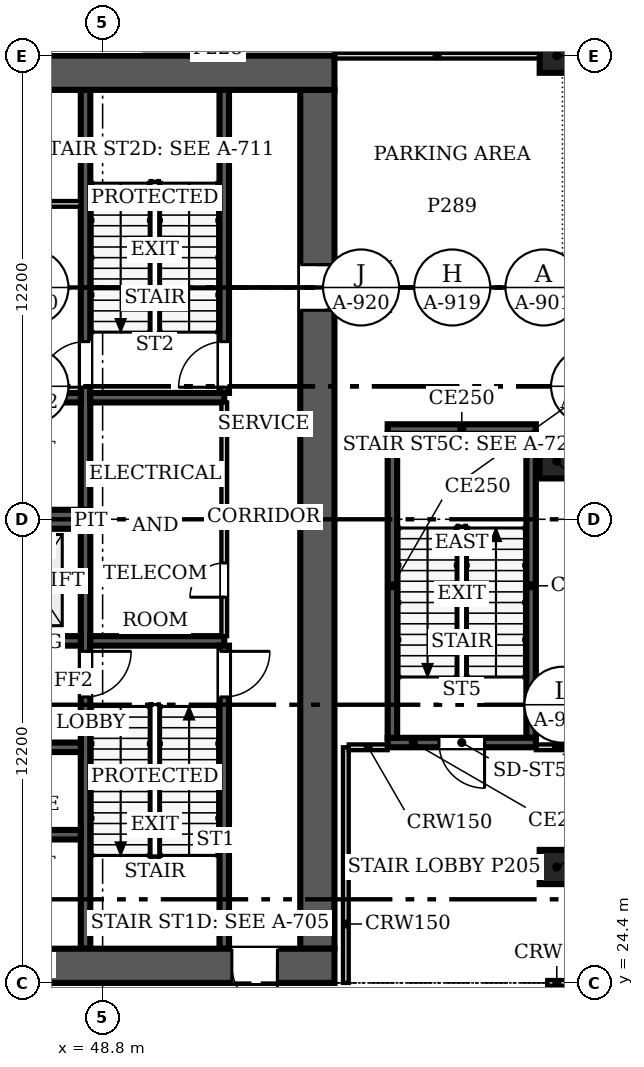
"""IFC4 building model, lengths in metres.
Left out: names, types, materials, properties, quantities, classifications, styles, units other than length and angle.
Written with IfcOpenShell. Run it as: python <this file> out.ifc"""

import sys

from ifc_helpers import new_model, si_unit, direction, frame, frame_2d, origin, origin_2d, place, context, subcontext, project, spatial, rectangle, extrude, source, transform, mapped, element, fill, save


model = new_model("IFC4")
c1 = context("Model", 3, precision=1e-05, world=origin(), true_north=direction((0.0, 1.0)))
c2 = subcontext(c1, "Body", "Model", "MODEL_VIEW")
j1 = project(units=[si_unit("LENGTHUNIT", "METRE"), si_unit("PLANEANGLEUNIT", "RADIAN")], contexts=[c1])
p1 = place(None, origin())
s1 = spatial("IfcSite", under=j1, at=p1, CompositionType="ELEMENT")
p2 = place(p1, origin())
s2 = spatial("IfcBuilding", under=s1, at=p2, CompositionType="ELEMENT")
p3 = place(p2, frame((0.0, 0.0, -5.4)))
s3 = spatial("IfcBuildingStorey", under=s2, at=p3, CompositionType="ELEMENT", Elevation=-5.4)
for number, where, z_axis, x_axis in (
    (1, (60.75, 27.45, 0.0), (0.0, 0.0, 1.0), (1.0, 0.0, 0.0)),
    (2, (60.75, 38.125, 0.0), (0.0, 0.0, 1.0), (1.0, 0.0, 0.0)),
    (3, (60.75, 48.8, 0.0), (0.0, 0.0, 1.0), (1.0, 0.0, 0.0)),
):
    element("IfcColumn", number, at=place(p3, frame(where, z_axis=z_axis, x_axis=x_axis)), inside=s3, PredefinedType="COLUMN", context=c2, shape_type="SweptSolid", body=[
        extrude(rectangle(XDim=0.9, YDim=0.9, at=origin_2d()), origin(), (0.0, 0.0, 1.0), 5.15),
    ])
p4 = place(p3, frame((54.9, 24.85, 0.0), z_axis=(0.0, 0.0, 1.0), x_axis=(-1.0, 0.0, 0.0)))
e4 = element("IfcWall", 4, at=p4, inside=s3, PredefinedType="SHEAR", context=c2, shape_type="SweptSolid", body=[
    extrude(rectangle(XDim=24.4, YDim=0.9, at=frame_2d((12.2, 0.0))), origin(), (0.0, 0.0, 1.0), 5.4),
])
m1 = source(origin(), c2, "Body", "SweptSolid", [
    extrude(rectangle(XDim=1.2, YDim=2.1, at=frame_2d((0.6, 1.05))), frame((0.0, 0.46, 0.0), z_axis=(0.0, -1.0, 0.0), x_axis=(1.0, 0.0, 0.0)), (0.0, 0.0, 1.0), 0.92),
])
p5 = place(p4, frame((1.5, 0.0, 0.0)))
e5 = element("IfcOpeningElement", 5, at=p5, cuts=e4, PredefinedType="OPENING", context=c2, shape_type="MappedRepresentation", body=[
    mapped(m1, transform((0.0, 0.0, 0.0), scale=1.0)),
])
p6 = place(p3, frame((30.5, 48.35, 0.0), z_axis=(0.0, 0.0, 1.0), x_axis=(1.0, 0.0, 0.0)))
e6 = element("IfcWall", 6, at=p6, inside=s3, PredefinedType="SHEAR", context=c2, shape_type="SweptSolid", body=[
    extrude(rectangle(XDim=24.4, YDim=0.9, at=frame_2d((12.2, 0.0))), origin(), (0.0, 0.0, 1.0), 5.4),
])
p7 = place(p3, frame((54.45, 47.9, 0.0), z_axis=(0.0, 0.0, 1.0), x_axis=(0.0, -1.0, 0.0)))
e7 = element("IfcWall", 7, at=p7, inside=s3, PredefinedType="SHEAR", context=c2, shape_type="SweptSolid", body=[
    extrude(rectangle(XDim=22.6, YDim=0.9, at=frame_2d((11.3, 0.0))), origin(), (0.0, 0.0, 1.0), 5.4),
])
p8 = place(p7, frame((4.6, 0.0, 0.0)))
e8 = element("IfcOpeningElement", 8, at=p8, cuts=e7, PredefinedType="OPENING", context=c2, shape_type="MappedRepresentation", body=[
    mapped(m1, transform((0.0, 0.0, 0.0), scale=1.0)),
])
p9 = place(p3, frame((31.4, 36.6, 0.0), z_axis=(0.0, 0.0, 1.0), x_axis=(1.0, 0.0, 0.0)))
e9 = element("IfcWall", 9, at=p9, inside=s3, PredefinedType="SHEAR", context=c2, shape_type="SweptSolid", body=[
    extrude(rectangle(XDim=16.95, YDim=0.5, at=frame_2d((8.475, 0.0))), origin(), (0.0, 0.0, 1.0), 5.4),
])
p10 = place(p3, frame((48.35, 36.35, 0.0), z_axis=(0.0, 0.0, 1.0), x_axis=(0.0, -1.0, 0.0)))
e10 = element("IfcWall", 10, at=p10, inside=s3, PredefinedType="SOLIDWALL", context=c2, shape_type="SweptSolid", body=[
    extrude(rectangle(XDim=11.05, YDim=0.25, at=frame_2d((5.525, 0.0))), origin(), (0.0, 0.0, 1.0), 5.4),
])
m2 = source(origin(), c2, "Body", "SweptSolid", [
    extrude(rectangle(XDim=1.2, YDim=2.1, at=frame_2d((0.6, 1.05))), frame((0.0, 0.135, 0.0), z_axis=(0.0, -1.0, 0.0), x_axis=(1.0, 0.0, 0.0)), (0.0, 0.0, 1.0), 0.27),
])
p11 = place(p10, frame((3.225, 0.0, 0.0)))
e11 = element("IfcOpeningElement", 11, at=p11, cuts=e10, PredefinedType="OPENING", context=c2, shape_type="MappedRepresentation", body=[
    mapped(m2, transform((0.0, 0.0, 0.0), scale=1.0)),
])
p12 = place(p3, frame((48.35, 47.9, 0.0), z_axis=(0.0, 0.0, 1.0), x_axis=(0.0, -1.0, 0.0)))
e12 = element("IfcWall", 12, at=p12, inside=s3, PredefinedType="SOLIDWALL", context=c2, shape_type="SweptSolid", body=[
    extrude(rectangle(XDim=11.05, YDim=0.25, at=frame_2d((5.525, 0.0))), origin(), (0.0, 0.0, 1.0), 5.4),
])
p13 = place(p12, frame((6.625, 0.0, 0.0)))
e13 = element("IfcOpeningElement", 13, at=p13, cuts=e12, PredefinedType="OPENING", context=c2, shape_type="MappedRepresentation", body=[
    mapped(m2, transform((0.0, 0.0, 0.0), scale=1.0)),
])
p14 = place(p3, frame((48.225, 33.4, 0.0), z_axis=(0.0, 0.0, 1.0), x_axis=(-1.0, 0.0, 0.0)))
e14 = element("IfcWall", 14, at=p14, inside=s3, PredefinedType="SOLIDWALL", context=c2, shape_type="SweptSolid", body=[
    extrude(rectangle(XDim=5.275, YDim=0.25, at=frame_2d((2.638, 0.0))), origin(), (0.0, 0.0, 1.0), 5.4),
])
p15 = place(p14, frame((3.512, 0.0, 0.0)))
e15 = element("IfcOpeningElement", 15, at=p15, cuts=e14, PredefinedType="OPENING", context=c2, shape_type="MappedRepresentation", body=[
    mapped(m2, transform((0.0, 0.0, 0.0), scale=1.0)),
])
p16 = place(p14, frame((0.688, 0.0, 0.0)))
e16 = element("IfcOpeningElement", 16, at=p16, cuts=e14, PredefinedType="OPENING", context=c2, shape_type="MappedRepresentation", body=[
    mapped(m2, transform((0.0, 0.0, 0.0), scale=1.0)),
])
p17 = place(p3, frame((48.475, 33.4, 0.0), z_axis=(0.0, 0.0, 1.0), x_axis=(1.0, 0.0, 0.0)))
e17 = element("IfcWall", 17, at=p17, inside=s3, PredefinedType="SOLIDWALL", context=c2, shape_type="SweptSolid", body=[
    extrude(rectangle(XDim=3.525, YDim=0.25, at=frame_2d((1.762, 0.0))), origin(), (0.0, 0.0, 1.0), 5.4),
])
for number, where, z_axis, x_axis in (
    (18, (42.95, 28.3, 0.0), (0.0, 0.0, 1.0), (1.0, 0.0, 0.0)),
    (19, (42.95, 39.8, 0.0), (0.0, 0.0, 1.0), (1.0, 0.0, 0.0)),
):
    element("IfcWall", number, at=place(p3, frame(where, z_axis=z_axis, x_axis=x_axis)), inside=s3, PredefinedType="SOLIDWALL", context=c2, shape_type="SweptSolid", body=[
        extrude(rectangle(XDim=5.275, YDim=0.25, at=frame_2d((2.638, 0.0))), origin(), (0.0, 0.0, 1.0), 5.4),
    ])
p18 = place(p3, frame((48.475, 39.8, 0.0), z_axis=(0.0, 0.0, 1.0), x_axis=(1.0, 0.0, 0.0)))
e20 = element("IfcWall", 20, at=p18, inside=s3, PredefinedType="SOLIDWALL", context=c2, shape_type="SweptSolid", body=[
    extrude(rectangle(XDim=3.525, YDim=0.25, at=frame_2d((1.762, 0.0))), origin(), (0.0, 0.0, 1.0), 5.4),
])
p19 = place(p3, frame((52.0, 25.3, 0.0), z_axis=(0.0, 0.0, 1.0), x_axis=(0.0, 1.0, 0.0)))
e21 = element("IfcWall", 21, at=p19, inside=s3, PredefinedType="SOLIDWALL", context=c2, shape_type="SweptSolid", body=[
    extrude(rectangle(XDim=7.975, YDim=0.25, at=frame_2d((3.987, 0.0))), origin(), (0.0, 0.0, 1.0), 5.4),
])
p20 = place(p19, frame((6.625, 0.0, 0.0)))
e22 = element("IfcOpeningElement", 22, at=p20, cuts=e21, PredefinedType="OPENING", context=c2, shape_type="MappedRepresentation", body=[
    mapped(m2, transform((0.0, 0.0, 0.0), scale=1.0)),
])
p21 = place(p3, frame((52.0, 39.925, 0.0), z_axis=(0.0, 0.0, 1.0), x_axis=(0.0, 1.0, 0.0)))
e23 = element("IfcWall", 23, at=p21, inside=s3, PredefinedType="SOLIDWALL", context=c2, shape_type="SweptSolid", body=[
    extrude(rectangle(XDim=7.975, YDim=0.25, at=frame_2d((3.987, 0.0))), origin(), (0.0, 0.0, 1.0), 5.4),
])
p22 = place(p21, frame((0.15, 0.0, 0.0)))
e24 = element("IfcOpeningElement", 24, at=p22, cuts=e23, PredefinedType="OPENING", context=c2, shape_type="MappedRepresentation", body=[
    mapped(m2, transform((0.0, 0.0, 0.0), scale=1.0)),
])
p23 = place(p3, frame((42.95, 30.6, 0.0), z_axis=(0.0, 0.0, 1.0), x_axis=(1.0, 0.0, 0.0)))
e25 = element("IfcWall", 25, at=p23, inside=s3, PredefinedType="SOLIDWALL", context=c2, shape_type="SweptSolid", body=[
    extrude(rectangle(XDim=5.275, YDim=0.25, at=frame_2d((2.638, 0.0))), origin(), (0.0, 0.0, 1.0), 5.4),
])
p24 = place(p3, frame((52.0, 33.525, 0.0), z_axis=(0.0, 0.0, 1.0), x_axis=(0.0, 1.0, 0.0)))
e26 = element("IfcWall", 26, at=p24, inside=s3, PredefinedType="PARTITIONING", context=c2, shape_type="SweptSolid", body=[
    extrude(rectangle(XDim=6.15, YDim=0.15, at=frame_2d((3.075, 0.0))), origin(), (0.0, 0.0, 1.0), 5.15),
])
m3 = source(origin(), c2, "Body", "SweptSolid", [
    extrude(rectangle(XDim=0.9, YDim=2.1, at=frame_2d((0.45, 1.05))), frame((0.0, 0.085, 0.0), z_axis=(0.0, -1.0, 0.0), x_axis=(1.0, 0.0, 0.0)), (0.0, 0.0, 1.0), 0.17),
])
p25 = place(p24, frame((1.025, 0.0, 0.0)))
e27 = element("IfcOpeningElement", 27, at=p25, cuts=e26, PredefinedType="OPENING", context=c2, shape_type="MappedRepresentation", body=[
    mapped(m3, transform((0.0, 0.0, 0.0), scale=1.0)),
])
p26 = place(p3, frame((45.65, 44.9, 0.0), z_axis=(0.0, 0.0, 1.0), x_axis=(1.0, 0.0, 0.0)))
e28 = element("IfcWall", 28, at=p26, inside=s3, PredefinedType="PARTITIONING", context=c2, shape_type="SweptSolid", body=[
    extrude(rectangle(XDim=2.575, YDim=0.15, at=frame_2d((1.288, 0.0))), origin(), (0.0, 0.0, 1.0), 5.15),
])
p27 = place(p26, frame((0.8, 0.0, 0.0)))
e29 = element("IfcOpeningElement", 29, at=p27, cuts=e28, PredefinedType="OPENING", context=c2, shape_type="MappedRepresentation", body=[
    mapped(m3, transform((0.0, 0.0, 0.0), scale=1.0)),
])
p28 = place(p3, frame((60.2, 30.725, 0.0), z_axis=(0.0, 0.0, 1.0), x_axis=(-1.0, 0.0, 0.0)))
e30 = element("IfcWall", 30, at=p28, inside=s3, PredefinedType="SOLIDWALL", context=c2, shape_type="SweptSolid", body=[
    extrude(rectangle(XDim=3.9, YDim=0.25, at=frame_2d((1.95, 0.0))), origin(), (0.0, 0.0, 1.0), 5.4),
])
p29 = place(p28, frame((1.35, 0.0, 0.0)))
e31 = element("IfcOpeningElement", 31, at=p29, cuts=e30, PredefinedType="OPENING", context=c2, shape_type="MappedRepresentation", body=[
    mapped(m2, transform((0.0, 0.0, 0.0), scale=1.0)),
])
p30 = place(p3, frame((56.425, 30.85, 0.0), z_axis=(0.0, 0.0, 1.0), x_axis=(0.0, 1.0, 0.0)))
e32 = element("IfcWall", 32, at=p30, inside=s3, PredefinedType="SOLIDWALL", context=c2, shape_type="SweptSolid", body=[
    extrude(rectangle(XDim=8.0, YDim=0.25, at=frame_2d((4.0, 0.0))), origin(), (0.0, 0.0, 1.0), 5.4),
])
p31 = place(p3, frame((56.3, 38.975, 0.0), z_axis=(0.0, 0.0, 1.0), x_axis=(1.0, 0.0, 0.0)))
e33 = element("IfcWall", 33, at=p31, inside=s3, PredefinedType="SOLIDWALL", context=c2, shape_type="SweptSolid", body=[
    extrude(rectangle(XDim=3.9, YDim=0.25, at=frame_2d((1.95, 0.0))), origin(), (0.0, 0.0, 1.0), 5.4),
])
p32 = place(p3, frame((60.075, 38.85, 0.0), z_axis=(0.0, 0.0, 1.0), x_axis=(0.0, -1.0, 0.0)))
e34 = element("IfcWall", 34, at=p32, inside=s3, PredefinedType="SOLIDWALL", context=c2, shape_type="SweptSolid", body=[
    extrude(rectangle(XDim=8.0, YDim=0.25, at=frame_2d((4.0, 0.0))), origin(), (0.0, 0.0, 1.0), 5.4),
])
p33 = place(p3, frame((55.2, 24.4, 0.0), z_axis=(0.0, 0.0, 1.0), x_axis=(0.0, 1.0, 0.0)))
e35 = element("IfcWall", 35, at=p33, inside=s3, PredefinedType="PARTITIONING", context=c2, shape_type="SweptSolid", body=[
    extrude(rectangle(XDim=6.2, YDim=0.15, at=frame_2d((3.1, 0.0))), origin(), (0.0, 0.0, 1.0), 4.315),
])
p34 = place(p3, frame((60.5, 24.4, 0.0), z_axis=(0.0, 0.0, 1.0), x_axis=(1.0, 0.0, 0.0)))
e36 = element("IfcWall", 36, at=p34, inside=s3, PredefinedType="PARTITIONING", context=c2, shape_type="SweptSolid", body=[
    extrude(rectangle(XDim=0.5, YDim=0.15, at=frame_2d((0.25, 0.0))), origin(), (0.0, 0.0, 1.0), 4.315),
])
p35 = place(p3, frame((61.0, 29.8, 0.0), z_axis=(0.0, 0.0, 1.0), x_axis=(0.0, 1.0, 0.0)))
e37 = element("IfcWall", 37, at=p35, inside=s3, PredefinedType="PARTITIONING", context=c2, shape_type="SweptSolid", body=[
    extrude(rectangle(XDim=0.8, YDim=0.15, at=frame_2d((0.4, 0.0))), origin(), (0.0, 0.0, 1.0), 4.315),
])
p36 = place(p3, frame((55.276, 30.6, 0.0), z_axis=(0.0, 0.0, 1.0), x_axis=(1.0, 0.0, 0.0)))
e38 = element("IfcWall", 38, at=p36, inside=s3, PredefinedType="PARTITIONING", context=c2, shape_type="SweptSolid", body=[
    extrude(rectangle(XDim=1.024, YDim=0.15, at=frame_2d((0.512, 0.0))), origin(), (0.0, 0.0, 1.0), 4.315),
])
p37 = place(p3, frame((60.2, 30.6, 0.0), z_axis=(0.0, 0.0, 1.0), x_axis=(1.0, 0.0, 0.0)))
e39 = element("IfcWall", 39, at=p37, inside=s3, PredefinedType="PARTITIONING", context=c2, shape_type="SweptSolid", body=[
    extrude(rectangle(XDim=0.724, YDim=0.15, at=frame_2d((0.362, 0.0))), origin(), (0.0, 0.0, 1.0), 4.315),
])
p38 = place(p3, frame((61.0, 42.101, 0.0), z_axis=(0.0, 0.0, 1.0), x_axis=(0.0, 1.0, 0.0)))
e40 = element("IfcWall", 40, at=p38, inside=s3, PredefinedType="PARTITIONING", context=c2, shape_type="SweptSolid", body=[
    extrude(rectangle(XDim=6.248, YDim=0.2, at=frame_2d((3.124, 0.0))), origin(), (0.0, 0.0, 1.0), 4.315),
])
p39 = place(p3, frame((54.9, 48.8, 0.0), z_axis=(0.0, 0.0, 1.0), x_axis=(1.0, 0.0, 0.0)))
e41 = element("IfcWall", 41, at=p39, inside=s3, PredefinedType="PARTITIONING", context=c2, shape_type="SweptSolid", body=[
    extrude(rectangle(XDim=5.399, YDim=0.15, at=frame_2d((2.7, 0.0))), origin(), (0.0, 0.0, 1.0), 4.315),
])
m4 = source(origin(), c2, "Body", "SweptSolid", [
    extrude(rectangle(XDim=1.2, YDim=2.1, at=frame_2d((0.6, 1.05))), frame((0.0, 0.025, 0.0), z_axis=(0.0, -1.0, 0.0), x_axis=(1.0, 0.0, 0.0)), (0.0, 0.0, 1.0), 0.05),
])
p40 = place(p5, origin())
e42 = element("IfcDoor", 42, at=p40, inside=s3, OperationType="SINGLE_SWING_LEFT", PredefinedType="DOOR", context=c2, shape_type="MappedRepresentation", body=[
    mapped(m4, transform((0.0, 0.0, 0.0), scale=1.0)),
])
fill(e5, e42)
p41 = place(p8, origin())
e43 = element("IfcDoor", 43, at=p41, inside=s3, OperationType="SINGLE_SWING_LEFT", PredefinedType="DOOR", context=c2, shape_type="MappedRepresentation", body=[
    mapped(m4, transform((0.0, 0.0, 0.0), scale=1.0)),
])
fill(e8, e43)
p42 = place(p11, origin())
e44 = element("IfcDoor", 44, at=p42, inside=s3, OperationType="SINGLE_SWING_LEFT", PredefinedType="DOOR", context=c2, shape_type="MappedRepresentation", body=[
    mapped(m4, transform((0.0, 0.0, 0.0), scale=1.0)),
])
fill(e11, e44)
p43 = place(p13, origin())
e45 = element("IfcDoor", 45, at=p43, inside=s3, OperationType="SINGLE_SWING_RIGHT", PredefinedType="DOOR", context=c2, shape_type="MappedRepresentation", body=[
    mapped(m4, transform((0.0, 0.0, 0.0), scale=1.0)),
])
fill(e13, e45)
p44 = place(p16, origin())
e46 = element("IfcDoor", 46, at=p44, inside=s3, OperationType="DOUBLE_DOOR_SLIDING", PredefinedType="DOOR", context=c2, shape_type="MappedRepresentation", body=[
    mapped(m4, transform((0.0, 0.0, 0.0), scale=1.0)),
])
fill(e16, e46)
p45 = place(p20, origin())
e47 = element("IfcDoor", 47, at=p45, inside=s3, OperationType="SINGLE_SWING_RIGHT", PredefinedType="DOOR", context=c2, shape_type="MappedRepresentation", body=[
    mapped(m4, transform((0.0, 0.0, 0.0), scale=1.0)),
])
fill(e22, e47)
p46 = place(p22, origin())
e48 = element("IfcDoor", 48, at=p46, inside=s3, OperationType="SINGLE_SWING_LEFT", PredefinedType="DOOR", context=c2, shape_type="MappedRepresentation", body=[
    mapped(m4, transform((0.0, 0.0, 0.0), scale=1.0)),
])
fill(e24, e48)
m5 = source(origin(), c2, "Body", "SweptSolid", [
    extrude(rectangle(XDim=0.9, YDim=2.1, at=frame_2d((0.45, 1.05))), frame((0.0, 0.025, 0.0), z_axis=(0.0, -1.0, 0.0), x_axis=(1.0, 0.0, 0.0)), (0.0, 0.0, 1.0), 0.05),
])
p47 = place(p25, origin())
e49 = element("IfcDoor", 49, at=p47, inside=s3, OperationType="SINGLE_SWING_LEFT", PredefinedType="DOOR", context=c2, shape_type="MappedRepresentation", body=[
    mapped(m5, transform((0.0, 0.0, 0.0), scale=1.0)),
])
fill(e27, e49)
p48 = place(p29, origin())
e50 = element("IfcDoor", 50, at=p48, inside=s3, OperationType="SINGLE_SWING_LEFT", PredefinedType="DOOR", context=c2, shape_type="MappedRepresentation", body=[
    mapped(m4, transform((0.0, 0.0, 0.0), scale=1.0)),
])
fill(e31, e50)
save(model, sys.argv[1])
